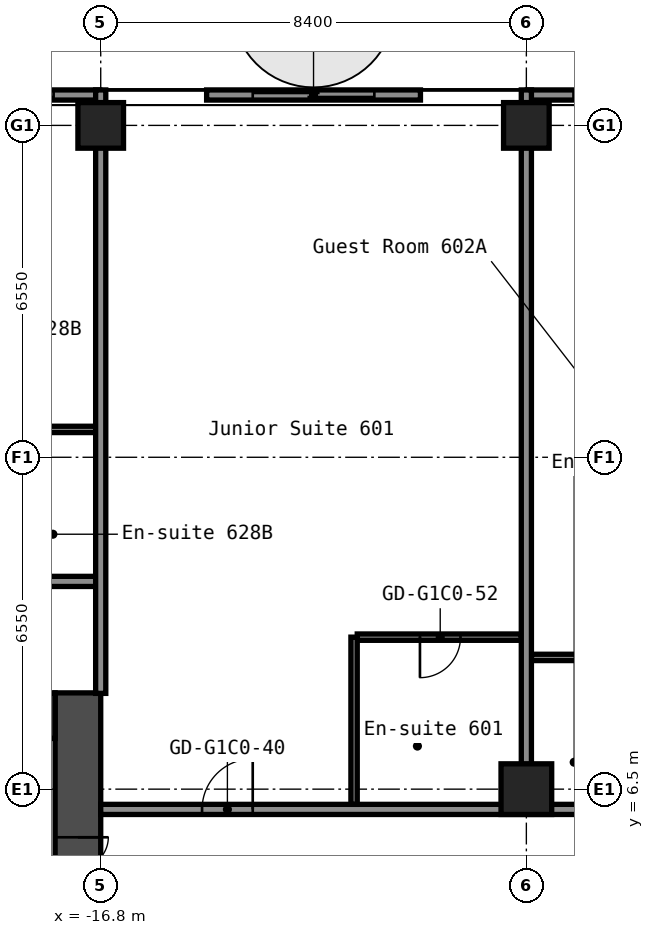
"""IFC4 building model, lengths in metres.
Left out: names, types, materials, properties, quantities, classifications, styles, units other than length and angle.
Written with IfcOpenShell. Run it as: python <this file> out.ifc"""

import sys

from ifc_helpers import new_model, si_unit, direction, frame, frame_2d, origin, origin_2d, place, context, subcontext, project, spatial, rectangle, hollow_rectangle, extrude, element, fill, save


model = new_model("IFC4")
c1 = context("Model", 3, precision=1e-05, world=origin(), true_north=direction((0.0, 1.0)))
c2 = subcontext(c1, "Body", "Model", "MODEL_VIEW")
j1 = project(units=[si_unit("LENGTHUNIT", "METRE"), si_unit("PLANEANGLEUNIT", "RADIAN")], contexts=[c1])
p1 = place(None, origin())
s1 = spatial("IfcSite", under=j1, at=p1, CompositionType="ELEMENT")
p2 = place(p1, origin())
s2 = spatial("IfcBuilding", under=s1, at=p2, CompositionType="ELEMENT")
p3 = place(p2, frame((0.0, 0.0, 26.2)))
s3 = spatial("IfcBuildingStorey", under=s2, at=p3, CompositionType="ELEMENT", Elevation=26.2)
p4 = place(p3, frame((-16.8, 19.6, 0.0), z_axis=(0.0, 0.0, 1.0), x_axis=(1.0, 0.0, 0.0)))
e1 = element("IfcColumn", 1, at=p4, inside=s3, PredefinedType="COLUMN", context=c2, shape_type="SweptSolid", body=[
    extrude(hollow_rectangle(XDim=0.9, YDim=0.9, WallThickness=0.036, at=origin_2d()), origin(), (0.0, 0.0, 1.0), 2.8),
])
p5 = place(p3, frame((-8.4, 6.5, 0.0), z_axis=(0.0, 0.0, 1.0), x_axis=(1.0, 0.0, 0.0)))
e2 = element("IfcColumn", 2, at=p5, inside=s3, PredefinedType="COLUMN", context=c2, shape_type="SweptSolid", body=[
    extrude(hollow_rectangle(XDim=1.0, YDim=1.0, WallThickness=0.04, at=origin_2d()), origin(), (0.0, 0.0, 1.0), 2.8),
])
p6 = place(p3, frame((-8.4, 19.6, 0.0), z_axis=(0.0, 0.0, 1.0), x_axis=(1.0, 0.0, 0.0)))
e3 = element("IfcColumn", 3, at=p6, inside=s3, PredefinedType="COLUMN", context=c2, shape_type="SweptSolid", body=[
    extrude(hollow_rectangle(XDim=0.9, YDim=0.9, WallThickness=0.036, at=origin_2d()), origin(), (0.0, 0.0, 1.0), 2.8),
])
p7 = place(p3, frame((-17.25, -8.4, 0.0), z_axis=(0.0, 0.0, 1.0), x_axis=(0.0, 1.0, 0.0)))
e4 = element("IfcWall", 4, at=p7, inside=s3, PredefinedType="SHEAR", context=c2, shape_type="SweptSolid", body=[
    extrude(rectangle(XDim=16.8, YDim=0.9, at=frame_2d((8.4, 0.0))), origin(), (0.0, 0.0, 1.0), 2.8),
])
p8 = place(p7, frame((12.75, 0.0, 0.0)))
e5 = element("IfcOpeningElement", 5, at=p8, cuts=e4, PredefinedType="OPENING", context=c2, shape_type="SweptSolid", body=[
    extrude(rectangle(XDim=1.2, YDim=2.1, at=frame_2d((0.6, 1.05))), frame((0.0, 0.46, 0.0), z_axis=(0.0, -1.0, 0.0), x_axis=(1.0, 0.0, 0.0)), (0.0, 0.0, 1.0), 0.92),
])
p9 = place(p7, frame((2.85, 0.0, 0.0)))
e6 = element("IfcOpeningElement", 6, at=p9, cuts=e4, PredefinedType="OPENING", context=c2, shape_type="SweptSolid", body=[
    extrude(rectangle(XDim=1.2, YDim=2.1, at=frame_2d((0.6, 1.05))), frame((0.0, 0.46, 0.0), z_axis=(0.0, -1.0, 0.0), x_axis=(1.0, 0.0, 0.0)), (0.0, 0.0, 1.0), 0.92),
])
p10 = place(p3, frame((-32.7, 7.95, 0.0), z_axis=(0.0, 0.0, 1.0), x_axis=(1.0, 0.0, 0.0)))
e7 = element("IfcWall", 7, at=p10, inside=s3, PredefinedType="SHEAR", context=c2, shape_type="SweptSolid", body=[
    extrude(rectangle(XDim=15.0, YDim=0.9, at=frame_2d((7.5, 0.0))), origin(), (0.0, 0.0, 1.0), 2.8),
])
p11 = place(p10, frame((3.4, 0.0, 0.0)))
e8 = element("IfcOpeningElement", 8, at=p11, cuts=e7, PredefinedType="OPENING", context=c2, shape_type="SweptSolid", body=[
    extrude(rectangle(XDim=1.2, YDim=2.1, at=frame_2d((0.6, 1.05))), frame((0.0, 0.46, 0.0), z_axis=(0.0, -1.0, 0.0), x_axis=(1.0, 0.0, 0.0)), (0.0, 0.0, 1.0), 0.92),
])
p12 = place(p10, frame((0.75, 0.0, 0.0)))
e9 = element("IfcOpeningElement", 9, at=p12, cuts=e7, PredefinedType="OPENING", context=c2, shape_type="SweptSolid", body=[
    extrude(rectangle(XDim=0.9, YDim=2.1, at=frame_2d((0.45, 1.05))), frame((0.0, 0.46, 0.0), z_axis=(0.0, -1.0, 0.0), x_axis=(1.0, 0.0, 0.0)), (0.0, 0.0, 1.0), 0.92),
])
p13 = place(p3, frame((-16.8, 6.1, 0.0), z_axis=(0.0, 0.0, 1.0), x_axis=(1.0, 0.0, 0.0)))
e10 = element("IfcWall", 10, at=p13, inside=s3, PredefinedType="PARTITIONING", context=c2, shape_type="SweptSolid", body=[
    extrude(rectangle(XDim=33.6, YDim=0.2, at=frame_2d((16.8, 0.0))), origin(), (0.0, 0.0, 1.0), 2.8),
])
p14 = place(p13, frame((2.0, 0.0, 0.0)))
e11 = element("IfcOpeningElement", 11, at=p14, cuts=e10, PredefinedType="OPENING", context=c2, shape_type="SweptSolid", body=[
    extrude(rectangle(XDim=1.0, YDim=2.1, at=frame_2d((0.5, 1.05))), frame((0.0, 0.11, 0.0), z_axis=(0.0, -1.0, 0.0), x_axis=(1.0, 0.0, 0.0)), (0.0, 0.0, 1.0), 0.22),
])
p15 = place(p13, frame((11.25, 0.0, 0.0)))
e12 = element("IfcOpeningElement", 12, at=p15, cuts=e10, PredefinedType="OPENING", context=c2, shape_type="SweptSolid", body=[
    extrude(rectangle(XDim=1.0, YDim=2.1, at=frame_2d((0.5, 1.05))), frame((0.0, 0.11, 0.0), z_axis=(0.0, -1.0, 0.0), x_axis=(1.0, 0.0, 0.0)), (0.0, 0.0, 1.0), 0.22),
])
p16 = place(p13, frame((12.95, 0.0, 0.0)))
e13 = element("IfcOpeningElement", 13, at=p16, cuts=e10, PredefinedType="OPENING", context=c2, shape_type="SweptSolid", body=[
    extrude(rectangle(XDim=1.0, YDim=2.1, at=frame_2d((0.5, 1.05))), frame((0.0, 0.11, 0.0), z_axis=(0.0, -1.0, 0.0), x_axis=(1.0, 0.0, 0.0)), (0.0, 0.0, 1.0), 0.22),
])
p17 = place(p13, frame((18.7, 0.0, 0.0)))
e14 = element("IfcOpeningElement", 14, at=p17, cuts=e10, PredefinedType="OPENING", context=c2, shape_type="SweptSolid", body=[
    extrude(rectangle(XDim=0.9, YDim=2.1, at=frame_2d((0.45, 1.05))), frame((0.0, 0.11, 0.0), z_axis=(0.0, -1.0, 0.0), x_axis=(1.0, 0.0, 0.0)), (0.0, 0.0, 1.0), 0.22),
])
p18 = place(p13, frame((22.9, 0.0, 0.0)))
e15 = element("IfcOpeningElement", 15, at=p18, cuts=e10, PredefinedType="OPENING", context=c2, shape_type="SweptSolid", body=[
    extrude(rectangle(XDim=0.9, YDim=2.1, at=frame_2d((0.45, 1.05))), frame((0.0, 0.11, 0.0), z_axis=(0.0, -1.0, 0.0), x_axis=(1.0, 0.0, 0.0)), (0.0, 0.0, 1.0), 0.22),
])
p19 = place(p13, frame((28.05, 0.0, 0.0)))
e16 = element("IfcOpeningElement", 16, at=p19, cuts=e10, PredefinedType="OPENING", context=c2, shape_type="SweptSolid", body=[
    extrude(rectangle(XDim=1.0, YDim=2.1, at=frame_2d((0.5, 1.05))), frame((0.0, 0.11, 0.0), z_axis=(0.0, -1.0, 0.0), x_axis=(1.0, 0.0, 0.0)), (0.0, 0.0, 1.0), 0.22),
])
p20 = place(p13, frame((29.75, 0.0, 0.0)))
e17 = element("IfcOpeningElement", 17, at=p20, cuts=e10, PredefinedType="OPENING", context=c2, shape_type="SweptSolid", body=[
    extrude(rectangle(XDim=1.0, YDim=2.1, at=frame_2d((0.5, 1.05))), frame((0.0, 0.11, 0.0), z_axis=(0.0, -1.0, 0.0), x_axis=(1.0, 0.0, 0.0)), (0.0, 0.0, 1.0), 0.22),
])
p21 = place(p3, frame((-8.3, 9.1, 0.0), z_axis=(0.0, 0.0, 1.0), x_axis=(1.0, 0.0, 0.0)))
e18 = element("IfcWall", 18, at=p21, inside=s3, PredefinedType="PARTITIONING", context=c2, shape_type="SweptSolid", body=[
    extrude(rectangle(XDim=2.338, YDim=0.125, at=frame_2d((1.169, 0.0))), origin(), (0.0, 0.0, 1.0), 2.8),
])
p22 = place(p3, frame((-11.738, 9.5, 0.0), z_axis=(0.0, 0.0, 1.0), x_axis=(1.0, 0.0, 0.0)))
e19 = element("IfcWall", 19, at=p22, inside=s3, PredefinedType="PARTITIONING", context=c2, shape_type="SweptSolid", body=[
    extrude(rectangle(XDim=3.238, YDim=0.125, at=frame_2d((1.619, 0.0))), origin(), (0.0, 0.0, 1.0), 2.8),
])
p23 = place(p22, frame((1.238, 0.0, 0.0)))
e20 = element("IfcOpeningElement", 20, at=p23, cuts=e19, PredefinedType="OPENING", context=c2, shape_type="SweptSolid", body=[
    extrude(rectangle(XDim=0.8, YDim=2.1, at=frame_2d((0.4, 1.05))), frame((0.0, 0.073, 0.0), z_axis=(0.0, -1.0, 0.0), x_axis=(1.0, 0.0, 0.0)), (0.0, 0.0, 1.0), 0.145),
])
p24 = place(p3, frame((-51.1, 10.6, 0.0), z_axis=(0.0, 0.0, 1.0), x_axis=(1.0, 0.0, 0.0)))
e21 = element("IfcWall", 21, at=p24, inside=s3, PredefinedType="PARTITIONING", context=c2, shape_type="SweptSolid", body=[
    extrude(rectangle(XDim=34.3, YDim=0.2, at=frame_2d((17.15, 0.0))), origin(), (0.0, 0.0, 1.0), 2.8),
])
p25 = place(p24, frame((2.5, 0.0, 0.0)))
e22 = element("IfcOpeningElement", 22, at=p25, cuts=e21, PredefinedType="OPENING", context=c2, shape_type="SweptSolid", body=[
    extrude(rectangle(XDim=1.0, YDim=2.1, at=frame_2d((0.5, 1.05))), frame((0.0, 0.11, 0.0), z_axis=(0.0, -1.0, 0.0), x_axis=(1.0, 0.0, 0.0)), (0.0, 0.0, 1.0), 0.22),
])
p26 = place(p24, frame((11.95, 0.0, 0.0)))
e23 = element("IfcOpeningElement", 23, at=p26, cuts=e21, PredefinedType="OPENING", context=c2, shape_type="SweptSolid", body=[
    extrude(rectangle(XDim=1.0, YDim=2.1, at=frame_2d((0.5, 1.05))), frame((0.0, 0.11, 0.0), z_axis=(0.0, -1.0, 0.0), x_axis=(1.0, 0.0, 0.0)), (0.0, 0.0, 1.0), 0.22),
])
p27 = place(p24, frame((13.65, 0.0, 0.0)))
e24 = element("IfcOpeningElement", 24, at=p27, cuts=e21, PredefinedType="OPENING", context=c2, shape_type="SweptSolid", body=[
    extrude(rectangle(XDim=1.0, YDim=2.1, at=frame_2d((0.5, 1.05))), frame((0.0, 0.11, 0.0), z_axis=(0.0, -1.0, 0.0), x_axis=(1.0, 0.0, 0.0)), (0.0, 0.0, 1.0), 0.22),
])
p28 = place(p24, frame((23.0, 0.0, 0.0)))
e25 = element("IfcOpeningElement", 25, at=p28, cuts=e21, PredefinedType="OPENING", context=c2, shape_type="SweptSolid", body=[
    extrude(rectangle(XDim=1.0, YDim=2.1, at=frame_2d((0.5, 1.05))), frame((0.0, 0.11, 0.0), z_axis=(0.0, -1.0, 0.0), x_axis=(1.0, 0.0, 0.0)), (0.0, 0.0, 1.0), 0.22),
])
p29 = place(p24, frame((28.75, 0.0, 0.0)))
e26 = element("IfcOpeningElement", 26, at=p29, cuts=e21, PredefinedType="OPENING", context=c2, shape_type="SweptSolid", body=[
    extrude(rectangle(XDim=1.0, YDim=2.1, at=frame_2d((0.5, 1.05))), frame((0.0, 0.11, 0.0), z_axis=(0.0, -1.0, 0.0), x_axis=(1.0, 0.0, 0.0)), (0.0, 0.0, 1.0), 0.22),
])
p30 = place(p24, frame((30.45, 0.0, 0.0)))
e27 = element("IfcOpeningElement", 27, at=p30, cuts=e21, PredefinedType="OPENING", context=c2, shape_type="SweptSolid", body=[
    extrude(rectangle(XDim=1.0, YDim=2.1, at=frame_2d((0.5, 1.05))), frame((0.0, 0.11, 0.0), z_axis=(0.0, -1.0, 0.0), x_axis=(1.0, 0.0, 0.0)), (0.0, 0.0, 1.0), 0.22),
])
p31 = place(p3, frame((-19.238, 13.6, 0.0), z_axis=(0.0, 0.0, 1.0), x_axis=(1.0, 0.0, 0.0)))
e28 = element("IfcWall", 28, at=p31, inside=s3, PredefinedType="PARTITIONING", context=c2, shape_type="SweptSolid", body=[
    extrude(rectangle(XDim=2.338, YDim=0.125, at=frame_2d((1.169, 0.0))), origin(), (0.0, 0.0, 1.0), 2.8),
])
p32 = place(p3, frame((-16.8, 8.39, 0.0), z_axis=(0.0, 0.0, 1.0), x_axis=(0.0, 1.0, 0.0)))
e29 = element("IfcWall", 29, at=p32, inside=s3, PredefinedType="PARTITIONING", context=c2, shape_type="SweptSolid", body=[
    extrude(rectangle(XDim=11.91, YDim=0.2, at=frame_2d((5.955, 0.0))), origin(), (0.0, 0.0, 1.0), 2.8),
])
p33 = place(p3, frame((-11.8, 6.2, 0.0), z_axis=(0.0, 0.0, 1.0), x_axis=(0.0, 1.0, 0.0)))
e30 = element("IfcWall", 30, at=p33, inside=s3, PredefinedType="PARTITIONING", context=c2, shape_type="SweptSolid", body=[
    extrude(rectangle(XDim=3.3, YDim=0.125, at=frame_2d((1.65, 0.0))), origin(), (0.0, 0.0, 1.0), 2.8),
])
p34 = place(p3, frame((-8.4, 6.99, 0.0), z_axis=(0.0, 0.0, 1.0), x_axis=(0.0, 1.0, 0.0)))
e31 = element("IfcWall", 31, at=p34, inside=s3, PredefinedType="PARTITIONING", context=c2, shape_type="SweptSolid", body=[
    extrude(rectangle(XDim=13.31, YDim=0.2, at=frame_2d((6.655, 0.0))), origin(), (0.0, 0.0, 1.0), 2.8),
])
p35 = place(p3, frame((-4.16, 20.2, 0.0), z_axis=(0.0, 0.0, 1.0), x_axis=(-1.0, 0.0, 0.0)))
p36 = place(p35, frame((0.91, 0.0, 0.0)))
p37 = place(p36, frame((2.4, 0.0, 0.0), z_axis=(0.0, 0.0, 1.0), x_axis=(-1.0, 0.0, 0.0)))
e32 = element("IfcDoor", 32, at=p37, inside=s3, OperationType="SLIDING_TO_LEFT", PredefinedType="DOOR", context=c2, shape_type="SweptSolid", body=[
    extrude(rectangle(XDim=2.4, YDim=2.2, at=frame_2d((1.2, 1.1))), frame((0.0, 0.025, 0.0), z_axis=(0.0, -1.0, 0.0), x_axis=(1.0, 0.0, 0.0)), (0.0, 0.0, 1.0), 0.05),
])
p38 = place(p3, frame((-10.49, 20.2, 0.0), z_axis=(0.0, 0.0, 1.0), x_axis=(-1.0, 0.0, 0.0)))
p39 = place(p38, frame((0.91, 0.0, 0.0)))
p40 = place(p39, frame((2.4, 0.0, 0.0), z_axis=(0.0, 0.0, 1.0), x_axis=(-1.0, 0.0, 0.0)))
e33 = element("IfcDoor", 33, at=p40, inside=s3, OperationType="SLIDING_TO_LEFT", PredefinedType="DOOR", context=c2, shape_type="SweptSolid", body=[
    extrude(rectangle(XDim=2.4, YDim=2.2, at=frame_2d((1.2, 1.1))), frame((0.0, 0.025, 0.0), z_axis=(0.0, -1.0, 0.0), x_axis=(1.0, 0.0, 0.0)), (0.0, 0.0, 1.0), 0.05),
])
p41 = place(p3, frame((-16.82, 20.2, 0.0), z_axis=(0.0, 0.0, 1.0), x_axis=(-1.0, 0.0, 0.0)))
p42 = place(p41, frame((0.91, 0.0, 0.0)))
p43 = place(p42, frame((2.4, 0.0, 0.0), z_axis=(0.0, 0.0, 1.0), x_axis=(-1.0, 0.0, 0.0)))
e34 = element("IfcDoor", 34, at=p43, inside=s3, OperationType="SLIDING_TO_LEFT", PredefinedType="DOOR", context=c2, shape_type="SweptSolid", body=[
    extrude(rectangle(XDim=2.4, YDim=2.2, at=frame_2d((1.2, 1.1))), frame((0.0, 0.025, 0.0), z_axis=(0.0, -1.0, 0.0), x_axis=(1.0, 0.0, 0.0)), (0.0, 0.0, 1.0), 0.05),
])
p44 = place(p8, origin())
e35 = element("IfcDoor", 35, at=p44, inside=s3, OperationType="DOUBLE_DOOR_SINGLE_SWING", PredefinedType="DOOR", context=c2, shape_type="SweptSolid", body=[
    extrude(rectangle(XDim=1.2, YDim=2.1, at=frame_2d((0.6, 1.05))), frame((0.0, 0.025, 0.0), z_axis=(0.0, -1.0, 0.0), x_axis=(1.0, 0.0, 0.0)), (0.0, 0.0, 1.0), 0.05),
])
fill(e5, e35)
p45 = place(p14, origin())
e36 = element("IfcDoor", 36, at=p45, inside=s3, OperationType="SINGLE_SWING_LEFT", PredefinedType="DOOR", context=c2, shape_type="SweptSolid", body=[
    extrude(rectangle(XDim=1.0, YDim=2.1, at=frame_2d((0.5, 1.05))), frame((0.0, 0.025, 0.0), z_axis=(0.0, -1.0, 0.0), x_axis=(1.0, 0.0, 0.0)), (0.0, 0.0, 1.0), 0.05),
])
fill(e11, e36)
p46 = place(p23, origin())
e37 = element("IfcDoor", 37, at=p46, inside=s3, OperationType="SINGLE_SWING_LEFT", PredefinedType="DOOR", context=c2, shape_type="SweptSolid", body=[
    extrude(rectangle(XDim=0.8, YDim=2.1, at=frame_2d((0.4, 1.05))), frame((0.0, 0.025, 0.0), z_axis=(0.0, -1.0, 0.0), x_axis=(1.0, 0.0, 0.0)), (0.0, 0.0, 1.0), 0.05),
])
fill(e20, e37)
save(model, sys.argv[1])
